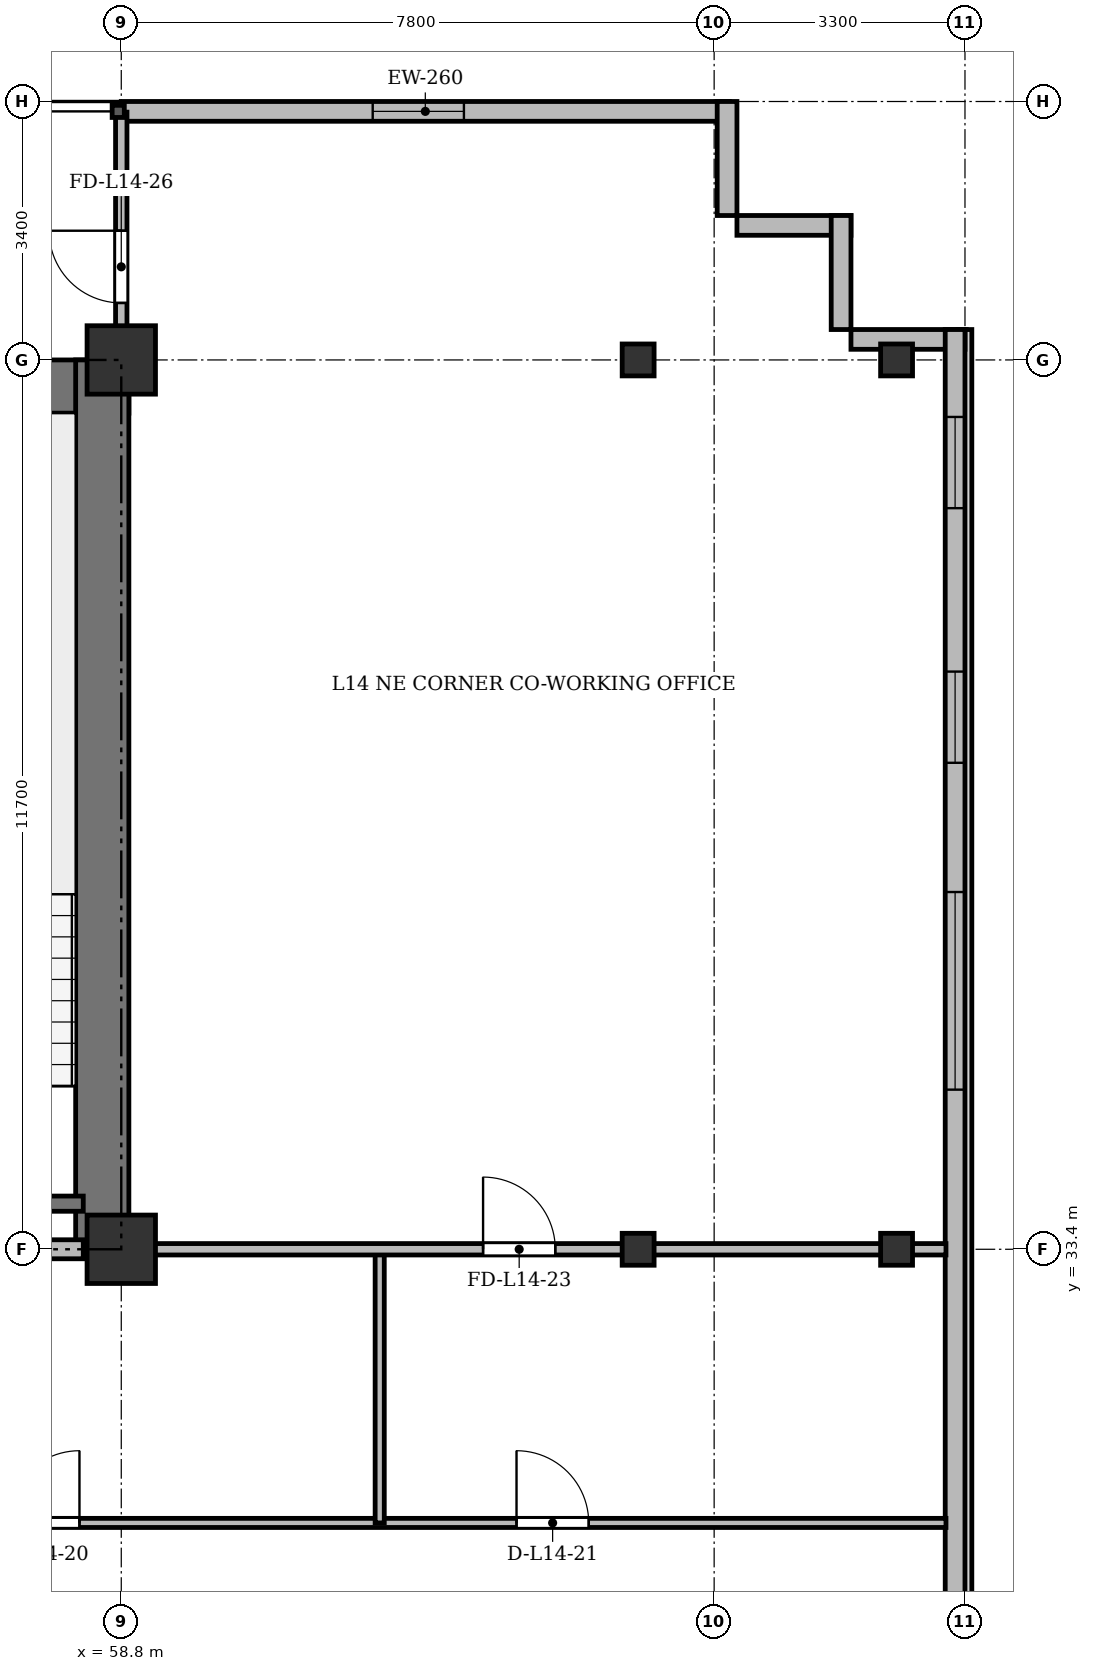
"""IFC4 building model, lengths in metres.
Left out: names, types, materials, properties, quantities, classifications, styles, units other than length and angle.
Written with IfcOpenShell. Run it as: python <this file> out.ifc"""

import sys

from ifc_helpers import new_model, si_unit, direction, frame, frame_2d, origin, origin_2d, place, context, subcontext, project, spatial, rectangle, i_section, extrude, source, transform, mapped, element, fill, save


model = new_model("IFC4")
c1 = context("Model", 3, precision=1e-05, world=origin(), true_north=direction((0.0, 1.0)))
c2 = subcontext(c1, "Body", "Model", "MODEL_VIEW")
j1 = project(units=[si_unit("LENGTHUNIT", "METRE"), si_unit("PLANEANGLEUNIT", "RADIAN")], contexts=[c1])
p1 = place(None, origin())
s1 = spatial("IfcSite", under=j1, at=p1, CompositionType="ELEMENT")
p2 = place(p1, origin())
s2 = spatial("IfcBuilding", under=s1, at=p2, CompositionType="ELEMENT")
p3 = place(p2, frame((0.0, 0.0, 55.9)))
s3 = spatial("IfcBuildingStorey", under=s2, at=p3, CompositionType="ELEMENT", Elevation=55.9)
m1 = source(origin(), c2, "Body", "SweptSolid", [
    extrude(rectangle(XDim=0.9, YDim=0.9, at=origin_2d()), origin(), (0.0, 0.0, 1.0), 3.6),
])
for number, where, z_axis, x_axis in (
    (1, (58.8, 33.4, 0.0), (0.0, 0.0, 1.0), (1.0, 0.0, 0.0)),
    (2, (58.8, 45.1, 0.0), (0.0, 0.0, 1.0), (1.0, 0.0, 0.0)),
):
    element("IfcColumn", number, at=place(p3, frame(where, z_axis=z_axis, x_axis=x_axis)), inside=s3, PredefinedType="COLUMN", context=c2, shape_type="MappedRepresentation", body=[
        mapped(m1, transform((0.0, 0.0, 0.0), x_axis=(1.0, 0.0, 0.0), y_axis=(0.0, 1.0, 0.0), z_axis=(0.0, 0.0, 1.0), scale=1.0)),
    ])
m2 = source(origin(), c2, "Body", "SweptSolid", [
    extrude(i_section(OverallWidth=0.42, OverallDepth=0.42, WebThickness=0.026, FlangeThickness=0.04, at=origin_2d()), origin(), (0.0, 0.0, 1.0), 3.6),
])
for number, where, z_axis, x_axis in (
    (3, (65.6, 33.4, 0.0), (0.0, 0.0, 1.0), (1.0, 0.0, 0.0)),
    (4, (65.6, 45.1, 0.0), (0.0, 0.0, 1.0), (1.0, 0.0, 0.0)),
    (5, (69.0, 33.4, 0.0), (0.0, 0.0, 1.0), (1.0, 0.0, 0.0)),
    (6, (69.0, 45.1, 0.0), (0.0, 0.0, 1.0), (1.0, 0.0, 0.0)),
):
    element("IfcColumn", number, at=place(p3, frame(where, z_axis=z_axis, x_axis=x_axis)), inside=s3, PredefinedType="COLUMN", context=c2, shape_type="MappedRepresentation", body=[
        mapped(m2, transform((0.0, 0.0, 0.0), x_axis=(1.0, 0.0, 0.0), y_axis=(0.0, 1.0, 0.0), z_axis=(0.0, 0.0, 1.0), scale=1.0)),
    ])
p4 = place(p3, frame((58.8, 48.37, 0.0), z_axis=(0.0, 0.0, 1.0), x_axis=(1.0, 0.0, 0.0)))
e7 = element("IfcWall", 7, at=p4, inside=s3, PredefinedType="SOLIDWALL", context=c2, shape_type="SweptSolid", body=[
    extrude(rectangle(XDim=8.0, YDim=0.26, at=frame_2d((4.0, 0.0))), origin(), (0.0, 0.0, 1.0), 3.34),
])
p5 = place(p4, frame((3.308, 0.0, 0.9)))
e8 = element("IfcOpeningElement", 8, at=p5, cuts=e7, PredefinedType="OPENING", context=c2, shape_type="SweptSolid", body=[
    extrude(rectangle(XDim=1.2, YDim=1.65, at=frame_2d((0.6, 0.825))), frame((0.0, 0.14, 0.0), z_axis=(0.0, -1.0, 0.0), x_axis=(1.0, 0.0, 0.0)), (0.0, 0.0, 1.0), 0.28),
])
for number, where, z_axis, x_axis in (
    (9, (66.77, 48.5, 0.0), (0.0, 0.0, 1.0), (0.0, -1.0, 0.0)),
    (10, (66.9, 46.87, 0.0), (0.0, 0.0, 1.0), (1.0, 0.0, 0.0)),
    (11, (68.27, 47.0, 0.0), (0.0, 0.0, 1.0), (0.0, -1.0, 0.0)),
):
    element("IfcWall", number, at=place(p3, frame(where, z_axis=z_axis, x_axis=x_axis)), inside=s3, PredefinedType="SOLIDWALL", context=c2, shape_type="SweptSolid", body=[
        extrude(rectangle(XDim=1.5, YDim=0.26, at=frame_2d((0.75, 0.0))), origin(), (0.0, 0.0, 1.0), 3.34),
    ])
p6 = place(p3, frame((68.4, 45.37, 0.0), z_axis=(0.0, 0.0, 1.0), x_axis=(1.0, 0.0, 0.0)))
e12 = element("IfcWall", 12, at=p6, inside=s3, PredefinedType="SOLIDWALL", context=c2, shape_type="SweptSolid", body=[
    extrude(rectangle(XDim=1.5, YDim=0.26, at=frame_2d((0.75, 0.0))), origin(), (0.0, 0.0, 1.0), 2.69),
])
p7 = place(p3, frame((69.77, 45.5, 0.0), z_axis=(0.0, 0.0, 1.0), x_axis=(0.0, -1.0, 0.0)))
e13 = element("IfcWall", 13, at=p7, inside=s3, PredefinedType="SOLIDWALL", context=c2, shape_type="SweptSolid", body=[
    extrude(rectangle(XDim=39.6, YDim=0.26, at=frame_2d((19.8, 0.0))), origin(), (0.0, 0.0, 1.0), 3.34),
])
p8 = place(p7, frame((36.95, 0.0, 0.92)))
e14 = element("IfcOpeningElement", 14, at=p8, cuts=e13, PredefinedType="OPENING", context=c2, shape_type="SweptSolid", body=[
    extrude(rectangle(XDim=1.2, YDim=1.65, at=frame_2d((0.6, 0.825))), frame((0.0, 0.14, 0.0), z_axis=(0.0, -1.0, 0.0), x_axis=(1.0, 0.0, 0.0)), (0.0, 0.0, 1.0), 0.28),
])
p9 = place(p7, frame((32.8, 0.0, 0.92)))
e15 = element("IfcOpeningElement", 15, at=p9, cuts=e13, PredefinedType="OPENING", context=c2, shape_type="SweptSolid", body=[
    extrude(rectangle(XDim=2.6, YDim=1.9, at=frame_2d((1.3, 0.95))), frame((0.0, 0.14, 0.0), z_axis=(0.0, -1.0, 0.0), x_axis=(1.0, 0.0, 0.0)), (0.0, 0.0, 1.0), 0.28),
])
p10 = place(p7, frame((28.6, 0.0, 0.92)))
e16 = element("IfcOpeningElement", 16, at=p10, cuts=e13, PredefinedType="OPENING", context=c2, shape_type="SweptSolid", body=[
    extrude(rectangle(XDim=2.6, YDim=1.9, at=frame_2d((1.3, 0.95))), frame((0.0, 0.14, 0.0), z_axis=(0.0, -1.0, 0.0), x_axis=(1.0, 0.0, 0.0)), (0.0, 0.0, 1.0), 0.28),
])
p11 = place(p7, frame((7.4, 0.0, 0.92)))
e17 = element("IfcOpeningElement", 17, at=p11, cuts=e13, PredefinedType="OPENING", context=c2, shape_type="SweptSolid", body=[
    extrude(rectangle(XDim=2.6, YDim=1.9, at=frame_2d((1.3, 0.95))), frame((0.0, 0.14, 0.0), z_axis=(0.0, -1.0, 0.0), x_axis=(1.0, 0.0, 0.0)), (0.0, 0.0, 1.0), 0.28),
])
p12 = place(p7, frame((4.5, 0.0, 0.92)))
e18 = element("IfcOpeningElement", 18, at=p12, cuts=e13, PredefinedType="OPENING", context=c2, shape_type="SweptSolid", body=[
    extrude(rectangle(XDim=1.2, YDim=1.65, at=frame_2d((0.6, 0.825))), frame((0.0, 0.14, 0.0), z_axis=(0.0, -1.0, 0.0), x_axis=(1.0, 0.0, 0.0)), (0.0, 0.0, 1.0), 0.28),
])
p13 = place(p7, frame((1.15, 0.0, 0.92)))
e19 = element("IfcOpeningElement", 19, at=p13, cuts=e13, PredefinedType="OPENING", context=c2, shape_type="SweptSolid", body=[
    extrude(rectangle(XDim=1.2, YDim=1.65, at=frame_2d((0.6, 0.825))), frame((0.0, 0.14, 0.0), z_axis=(0.0, -1.0, 0.0), x_axis=(1.0, 0.0, 0.0)), (0.0, 0.0, 1.0), 0.28),
])
p14 = place(p3, frame((15.5, 44.75, 0.0), z_axis=(0.0, 0.0, 1.0), x_axis=(1.0, 0.0, 0.0)))
e20 = element("IfcWall", 20, at=p14, inside=s3, PredefinedType="SHEAR", context=c2, shape_type="SweptSolid", body=[
    extrude(rectangle(XDim=43.4, YDim=0.7, at=frame_2d((21.7, 0.0))), origin(), (0.0, 0.0, 1.0), 3.34),
])
p15 = place(p3, frame((58.55, 33.4, 0.0), z_axis=(0.0, 0.0, 1.0), x_axis=(0.0, 1.0, 0.0)))
e21 = element("IfcWall", 21, at=p15, inside=s3, PredefinedType="SHEAR", context=c2, shape_type="SweptSolid", body=[
    extrude(rectangle(XDim=11.7, YDim=0.7, at=frame_2d((5.85, 0.0))), origin(), (0.0, 0.0, 1.0), 3.34),
])
p16 = place(p3, frame((54.9, 34.0, 0.0), z_axis=(0.0, 0.0, 1.0), x_axis=(1.0, 0.0, 0.0)))
e22 = element("IfcWall", 22, at=p16, inside=s3, PredefinedType="SHEAR", context=c2, shape_type="SweptSolid", body=[
    extrude(rectangle(XDim=3.4, YDim=0.2, at=frame_2d((1.7, 0.0))), origin(), (0.0, 0.0, 1.0), 3.34),
])
p17 = place(p3, frame((47.15, 33.4, 0.0), z_axis=(0.0, 0.0, 1.0), x_axis=(1.0, 0.0, 0.0)))
e23 = element("IfcWall", 23, at=p17, inside=s3, PredefinedType="PARTITIONING", context=c2, shape_type="SweptSolid", body=[
    extrude(rectangle(XDim=11.15, YDim=0.25, at=frame_2d((5.575, 0.0))), origin(), (0.0, 0.0, 1.0), 2.69),
])
p18 = place(p17, frame((0.7, 0.0, 0.0)))
e24 = element("IfcOpeningElement", 24, at=p18, cuts=e23, PredefinedType="OPENING", context=c2, shape_type="SweptSolid", body=[
    extrude(rectangle(XDim=0.95, YDim=2.15, at=frame_2d((0.475, 1.075))), frame((0.0, 0.135, 0.0), z_axis=(0.0, -1.0, 0.0), x_axis=(1.0, 0.0, 0.0)), (0.0, 0.0, 1.0), 0.27),
])
p19 = place(p17, frame((6.0, 0.0, 0.0)))
e25 = element("IfcOpeningElement", 25, at=p19, cuts=e23, PredefinedType="OPENING", context=c2, shape_type="SweptSolid", body=[
    extrude(rectangle(XDim=1.2, YDim=2.15, at=frame_2d((0.6, 1.075))), frame((0.0, 0.135, 0.0), z_axis=(0.0, -1.0, 0.0), x_axis=(1.0, 0.0, 0.0)), (0.0, 0.0, 1.0), 0.27),
])
p20 = place(p3, frame((54.8, 29.8, 0.0), z_axis=(0.0, 0.0, 1.0), x_axis=(1.0, 0.0, 0.0)))
e26 = element("IfcWall", 26, at=p20, inside=s3, PredefinedType="PARTITIONING", context=c2, shape_type="SweptSolid", body=[
    extrude(rectangle(XDim=14.85, YDim=0.12, at=frame_2d((7.425, 0.0))), origin(), (0.0, 0.0, 1.0), 2.752),
])
p21 = place(p20, frame((2.5, 0.0, 0.0)))
e27 = element("IfcOpeningElement", 27, at=p21, cuts=e26, PredefinedType="OPENING", context=c2, shape_type="SweptSolid", body=[
    extrude(rectangle(XDim=0.95, YDim=2.15, at=frame_2d((0.475, 1.075))), frame((0.0, 0.07, 0.0), z_axis=(0.0, -1.0, 0.0), x_axis=(1.0, 0.0, 0.0)), (0.0, 0.0, 1.0), 0.14),
])
p22 = place(p20, frame((9.2, 0.0, 0.0)))
e28 = element("IfcOpeningElement", 28, at=p22, cuts=e26, PredefinedType="OPENING", context=c2, shape_type="SweptSolid", body=[
    extrude(rectangle(XDim=0.95, YDim=2.15, at=frame_2d((0.475, 1.075))), frame((0.0, 0.07, 0.0), z_axis=(0.0, -1.0, 0.0), x_axis=(1.0, 0.0, 0.0)), (0.0, 0.0, 1.0), 0.14),
])
p23 = place(p3, frame((62.2, 29.8, 0.0), z_axis=(0.0, 0.0, 1.0), x_axis=(0.0, 1.0, 0.0)))
e29 = element("IfcWall", 29, at=p23, inside=s3, PredefinedType="PARTITIONING", context=c2, shape_type="SweptSolid", body=[
    extrude(rectangle(XDim=3.6, YDim=0.12, at=frame_2d((1.8, 0.0))), origin(), (0.0, 0.0, 1.0), 2.69),
])
p24 = place(p3, frame((58.8, 33.4, 0.0), z_axis=(0.0, 0.0, 1.0), x_axis=(1.0, 0.0, 0.0)))
e30 = element("IfcWall", 30, at=p24, inside=s3, PredefinedType="PARTITIONING", context=c2, shape_type="SweptSolid", body=[
    extrude(rectangle(XDim=10.85, YDim=0.15, at=frame_2d((5.425, 0.0))), origin(), (0.0, 0.0, 1.0), 2.69),
])
p25 = place(p24, frame((4.76, 0.0, 0.0)))
e31 = element("IfcOpeningElement", 31, at=p25, cuts=e30, PredefinedType="OPENING", context=c2, shape_type="SweptSolid", body=[
    extrude(rectangle(XDim=0.95, YDim=2.15, at=frame_2d((0.475, 1.075))), frame((0.0, 0.085, 0.0), z_axis=(0.0, -1.0, 0.0), x_axis=(1.0, 0.0, 0.0)), (0.0, 0.0, 1.0), 0.17),
])
p26 = place(p3, frame((58.8, 44.75, 0.0), z_axis=(0.0, 0.0, 1.0), x_axis=(0.0, 1.0, 0.0)))
e32 = element("IfcWall", 32, at=p26, inside=s3, PredefinedType="PARTITIONING", context=c2, shape_type="SweptSolid", body=[
    extrude(rectangle(XDim=3.61, YDim=0.15, at=frame_2d((1.805, 0.0))), origin(), (0.0, 0.0, 1.0), 2.752),
])
p27 = place(p26, frame((1.1, 0.0, 0.0)))
e33 = element("IfcOpeningElement", 33, at=p27, cuts=e32, PredefinedType="OPENING", context=c2, shape_type="SweptSolid", body=[
    extrude(rectangle(XDim=0.95, YDim=2.15, at=frame_2d((0.475, 1.075))), frame((0.0, 0.085, 0.0), z_axis=(0.0, -1.0, 0.0), x_axis=(1.0, 0.0, 0.0)), (0.0, 0.0, 1.0), 0.17),
])
m3 = source(origin(), c2, "Body", "SweptSolid", [
    extrude(rectangle(XDim=1.2, YDim=1.65, at=frame_2d((0.6, 0.825))), frame((0.0, 0.03, 0.0), z_axis=(0.0, -1.0, 0.0), x_axis=(1.0, 0.0, 0.0)), (0.0, 0.0, 1.0), 0.06),
])
p28 = place(p5, origin())
e34 = element("IfcWindow", 34, at=p28, inside=s3, PartitioningType="SINGLE_PANEL", PredefinedType="WINDOW", context=c2, shape_type="MappedRepresentation", body=[
    mapped(m3, transform((0.0, 0.0, 0.0), x_axis=(1.0, 0.0, 0.0), y_axis=(0.0, 1.0, 0.0), z_axis=(0.0, 0.0, 1.0), scale=1.0)),
])
fill(e8, e34)
m4 = source(origin(), c2, "Body", "SweptSolid", [
    extrude(rectangle(XDim=2.6, YDim=1.9, at=frame_2d((1.3, 0.95))), frame((0.0, 0.03, 0.0), z_axis=(0.0, -1.0, 0.0), x_axis=(1.0, 0.0, 0.0)), (0.0, 0.0, 1.0), 0.06),
])
p29 = place(p11, origin())
e35 = element("IfcWindow", 35, at=p29, inside=s3, PartitioningType="SINGLE_PANEL", PredefinedType="WINDOW", context=c2, shape_type="MappedRepresentation", body=[
    mapped(m4, transform((0.0, 0.0, 0.0), x_axis=(1.0, 0.0, 0.0), y_axis=(0.0, 1.0, 0.0), z_axis=(0.0, 0.0, 1.0), scale=1.0)),
])
fill(e17, e35)
p30 = place(p12, origin())
e36 = element("IfcWindow", 36, at=p30, inside=s3, PartitioningType="SINGLE_PANEL", PredefinedType="WINDOW", context=c2, shape_type="MappedRepresentation", body=[
    mapped(m3, transform((0.0, 0.0, 0.0), x_axis=(1.0, 0.0, 0.0), y_axis=(0.0, 1.0, 0.0), z_axis=(0.0, 0.0, 1.0), scale=1.0)),
])
fill(e18, e36)
p31 = place(p13, origin())
e37 = element("IfcWindow", 37, at=p31, inside=s3, PartitioningType="SINGLE_PANEL", PredefinedType="WINDOW", context=c2, shape_type="MappedRepresentation", body=[
    mapped(m3, transform((0.0, 0.0, 0.0), x_axis=(1.0, 0.0, 0.0), y_axis=(0.0, 1.0, 0.0), z_axis=(0.0, 0.0, 1.0), scale=1.0)),
])
fill(e19, e37)
m5 = source(origin(), c2, "Body", "SweptSolid", [
    extrude(rectangle(XDim=0.95, YDim=2.15, at=frame_2d((0.475, 1.075))), frame((0.0, 0.025, 0.0), z_axis=(0.0, -1.0, 0.0), x_axis=(1.0, 0.0, 0.0)), (0.0, 0.0, 1.0), 0.05),
])
p32 = place(p21, origin())
e38 = element("IfcDoor", 38, at=p32, inside=s3, OperationType="SINGLE_SWING_RIGHT", PredefinedType="DOOR", context=c2, shape_type="MappedRepresentation", body=[
    mapped(m5, transform((0.0, 0.0, 0.0), x_axis=(1.0, 0.0, 0.0), y_axis=(0.0, 1.0, 0.0), z_axis=(0.0, 0.0, 1.0), scale=1.0)),
])
fill(e27, e38)
p33 = place(p22, origin())
e39 = element("IfcDoor", 39, at=p33, inside=s3, OperationType="SINGLE_SWING_LEFT", PredefinedType="DOOR", context=c2, shape_type="MappedRepresentation", body=[
    mapped(m5, transform((0.0, 0.0, 0.0), x_axis=(1.0, 0.0, 0.0), y_axis=(0.0, 1.0, 0.0), z_axis=(0.0, 0.0, 1.0), scale=1.0)),
])
fill(e28, e39)
p34 = place(p25, origin())
e40 = element("IfcDoor", 40, at=p34, inside=s3, OperationType="SINGLE_SWING_LEFT", PredefinedType="DOOR", context=c2, shape_type="MappedRepresentation", body=[
    mapped(m5, transform((0.0, 0.0, 0.0), x_axis=(1.0, 0.0, 0.0), y_axis=(0.0, 1.0, 0.0), z_axis=(0.0, 0.0, 1.0), scale=1.0)),
])
fill(e31, e40)
p35 = place(p27, origin())
e41 = element("IfcDoor", 41, at=p35, inside=s3, OperationType="SINGLE_SWING_RIGHT", PredefinedType="DOOR", context=c2, shape_type="MappedRepresentation", body=[
    mapped(m5, transform((0.0, 0.0, 0.0), x_axis=(1.0, 0.0, 0.0), y_axis=(0.0, 1.0, 0.0), z_axis=(0.0, 0.0, 1.0), scale=1.0)),
])
fill(e33, e41)
save(model, sys.argv[1])
